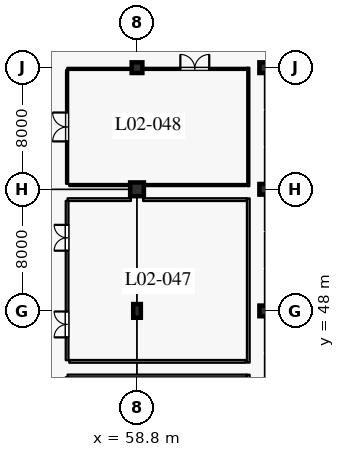
"""IFC4 building model, lengths in metres.
Left out: names, types, materials, properties, quantities, classifications, styles, units other than length and angle.
Written with IfcOpenShell. Run it as: python <this file> out.ifc"""

import sys

from ifc_helpers import new_model, si_unit, direction, frame, frame_2d, origin, origin_2d, place, context, subcontext, project, spatial, rectangle, hollow_rectangle, extrude, element, fill, save


model = new_model("IFC4")
c1 = context("Model", 3, precision=1e-05, world=origin(), true_north=direction((0.0, 1.0)))
c2 = subcontext(c1, "Body", "Model", "MODEL_VIEW")
j1 = project(units=[si_unit("LENGTHUNIT", "METRE"), si_unit("PLANEANGLEUNIT", "RADIAN")], contexts=[c1])
p1 = place(None, origin())
s1 = spatial("IfcSite", under=j1, at=p1, CompositionType="ELEMENT")
p2 = place(p1, origin())
s2 = spatial("IfcBuilding", under=s1, at=p2, CompositionType="ELEMENT")
p3 = place(p2, frame((0.0, 0.0, 11.4)))
s3 = spatial("IfcBuildingStorey", under=s2, at=p3, CompositionType="ELEMENT", Elevation=11.4)
p4 = place(p3, frame((58.8, 48.0, 0.0), z_axis=(0.0, 0.0, 1.0), x_axis=(1.0, 0.0, 0.0)))
e1 = element("IfcColumn", 1, at=p4, inside=s3, PredefinedType="COLUMN", context=c2, shape_type="SweptSolid", body=[
    extrude(hollow_rectangle(XDim=0.5, YDim=0.9, WallThickness=0.024, at=origin_2d()), origin(), (0.0, 0.0, 1.0), 4.8),
])
p5 = place(p3, frame((58.8, 56.0, 0.0), z_axis=(0.0, 0.0, 1.0), x_axis=(1.0, 0.0, 0.0)))
e2 = element("IfcColumn", 2, at=p5, inside=s3, PredefinedType="COLUMN", context=c2, shape_type="SweptSolid", body=[
    extrude(rectangle(XDim=0.9, YDim=0.9, at=origin_2d()), origin(), (0.0, 0.0, 1.0), 4.8),
])
for number, where, z_axis, x_axis in (
    (3, (58.8, 64.0, 0.0), (0.0, 0.0, 1.0), (1.0, 0.0, 0.0)),
    (4, (67.2, 48.0, 0.0), (0.0, 0.0, 1.0), (1.0, 0.0, 0.0)),
    (5, (67.2, 56.0, 0.0), (0.0, 0.0, 1.0), (1.0, 0.0, 0.0)),
    (6, (67.2, 64.0, 0.0), (0.0, 0.0, 1.0), (1.0, 0.0, 0.0)),
):
    element("IfcColumn", number, at=place(p3, frame(where, z_axis=z_axis, x_axis=x_axis)), inside=s3, PredefinedType="COLUMN", context=c2, shape_type="SweptSolid", body=[
        extrude(rectangle(XDim=0.7, YDim=0.7, at=origin_2d()), origin(), (0.0, 0.0, 1.0), 4.8),
    ])
p6 = place(p3, frame((54.2, 32.56, 0.0), z_axis=(0.0, 0.0, 1.0), x_axis=(0.0, 1.0, 0.0)))
e7 = element("IfcWall", 7, at=p6, inside=s3, PredefinedType="PARTITIONING", context=c2, shape_type="SweptSolid", body=[
    extrude(rectangle(XDim=11.08, YDim=0.18, at=frame_2d((5.54, 0.0))), origin(), (0.0, 0.0, 1.0), 4.535),
])
p7 = place(p6, frame((4.69, 0.0, 0.0)))
e8 = element("IfcOpeningElement", 8, at=p7, cuts=e7, PredefinedType="OPENING", context=c2, shape_type="SweptSolid", body=[
    extrude(rectangle(XDim=1.7, YDim=2.3, at=frame_2d((0.85, 1.15))), frame((0.0, 0.1, 0.0), z_axis=(0.0, -1.0, 0.0), x_axis=(1.0, 0.0, 0.0)), (0.0, 0.0, 1.0), 0.2),
])
p8 = place(p3, frame((54.2, 44.76, 0.0), z_axis=(0.0, 0.0, 1.0), x_axis=(0.0, 1.0, 0.0)))
e9 = element("IfcWall", 9, at=p8, inside=s3, PredefinedType="PARTITIONING", context=c2, shape_type="SweptSolid", body=[
    extrude(rectangle(XDim=10.48, YDim=0.18, at=frame_2d((5.24, 0.0))), origin(), (0.0, 0.0, 1.0), 4.535),
])
p9 = place(p8, frame((1.5, 0.0, 0.0)))
e10 = element("IfcOpeningElement", 10, at=p9, cuts=e9, PredefinedType="OPENING", context=c2, shape_type="SweptSolid", body=[
    extrude(rectangle(XDim=1.7, YDim=2.3, at=frame_2d((0.85, 1.15))), frame((0.0, 0.1, 0.0), z_axis=(0.0, -1.0, 0.0), x_axis=(1.0, 0.0, 0.0)), (0.0, 0.0, 1.0), 0.2),
])
p10 = place(p8, frame((7.2, 0.0, 0.0)))
e11 = element("IfcOpeningElement", 11, at=p10, cuts=e9, PredefinedType="OPENING", context=c2, shape_type="SweptSolid", body=[
    extrude(rectangle(XDim=1.7, YDim=2.3, at=frame_2d((0.85, 1.15))), frame((0.0, 0.1, 0.0), z_axis=(0.0, -1.0, 0.0), x_axis=(1.0, 0.0, 0.0)), (0.0, 0.0, 1.0), 0.2),
])
p11 = place(p3, frame((54.34, 44.68, 0.0), z_axis=(0.0, 0.0, 1.0), x_axis=(1.0, 0.0, 0.0)))
e12 = element("IfcWall", 12, at=p11, inside=s3, PredefinedType="PARTITIONING", context=c2, shape_type="SweptSolid", body=[
    extrude(rectangle(XDim=11.61, YDim=0.18, at=frame_2d((5.805, 0.0))), origin(), (0.0, 0.0, 1.0), 4.535),
])
p12 = place(p3, frame((54.2, 56.36, 0.0), z_axis=(0.0, 0.0, 1.0), x_axis=(0.0, 1.0, 0.0)))
e13 = element("IfcWall", 13, at=p12, inside=s3, PredefinedType="PARTITIONING", context=c2, shape_type="SweptSolid", body=[
    extrude(rectangle(XDim=7.48, YDim=0.14, at=frame_2d((3.74, 0.0))), origin(), (0.0, 0.0, 1.0), 4.535),
])
p13 = place(p12, frame((2.79, 0.0, 0.0)))
e14 = element("IfcOpeningElement", 14, at=p13, cuts=e13, PredefinedType="OPENING", context=c2, shape_type="SweptSolid", body=[
    extrude(rectangle(XDim=1.9, YDim=2.4, at=frame_2d((0.95, 1.2))), frame((0.0, 0.08, 0.0), z_axis=(0.0, -1.0, 0.0), x_axis=(1.0, 0.0, 0.0)), (0.0, 0.0, 1.0), 0.16),
])
p14 = place(p3, frame((54.34, 56.28, 0.0), z_axis=(0.0, 0.0, 1.0), x_axis=(1.0, 0.0, 0.0)))
e15 = element("IfcWall", 15, at=p14, inside=s3, PredefinedType="PARTITIONING", context=c2, shape_type="SweptSolid", body=[
    extrude(rectangle(XDim=11.61, YDim=0.14, at=frame_2d((5.805, 0.0))), origin(), (0.0, 0.0, 1.0), 4.535),
])
p15 = place(p3, frame((66.12, 32.4, 0.0), z_axis=(0.0, 0.0, 1.0), x_axis=(0.0, 1.0, 0.0)))
e16 = element("IfcWall", 16, at=p15, inside=s3, PredefinedType="PARTITIONING", context=c2, shape_type="SweptSolid", body=[
    extrude(rectangle(XDim=11.4, YDim=0.18, at=frame_2d((5.7, 0.0))), origin(), (0.0, 0.0, 1.0), 4.535),
])
p16 = place(p3, frame((54.232, 43.72, 0.0), z_axis=(0.0, 0.0, 1.0), x_axis=(1.0, 0.0, 0.0)))
e17 = element("IfcWall", 17, at=p16, inside=s3, PredefinedType="PARTITIONING", context=c2, shape_type="SweptSolid", body=[
    extrude(rectangle(XDim=11.798, YDim=0.18, at=frame_2d((5.899, 0.0))), origin(), (0.0, 0.0, 1.0), 4.535),
])
p17 = place(p3, frame((66.12, 44.6, 0.0), z_axis=(0.0, 0.0, 1.0), x_axis=(0.0, 1.0, 0.0)))
e18 = element("IfcWall", 18, at=p17, inside=s3, PredefinedType="PARTITIONING", context=c2, shape_type="SweptSolid", body=[
    extrude(rectangle(XDim=10.8, YDim=0.18, at=frame_2d((5.4, 0.0))), origin(), (0.0, 0.0, 1.0), 4.535),
])
p18 = place(p3, frame((54.232, 55.32, 0.0), z_axis=(0.0, 0.0, 1.0), x_axis=(1.0, 0.0, 0.0)))
e19 = element("IfcWall", 19, at=p18, inside=s3, PredefinedType="PARTITIONING", context=c2, shape_type="SweptSolid", body=[
    extrude(rectangle(XDim=4.168, YDim=0.18, at=frame_2d((2.084, 0.0))), origin(), (0.0, 0.0, 1.0), 4.535),
])
p19 = place(p3, frame((59.2, 55.32, 0.0), z_axis=(0.0, 0.0, 1.0), x_axis=(1.0, 0.0, 0.0)))
e20 = element("IfcWall", 20, at=p19, inside=s3, PredefinedType="PARTITIONING", context=c2, shape_type="SweptSolid", body=[
    extrude(rectangle(XDim=6.83, YDim=0.18, at=frame_2d((3.415, 0.0))), origin(), (0.0, 0.0, 1.0), 4.535),
])
p20 = place(p3, frame((66.12, 56.2, 0.0), z_axis=(0.0, 0.0, 1.0), x_axis=(0.0, 1.0, 0.0)))
e21 = element("IfcWall", 21, at=p20, inside=s3, PredefinedType="PARTITIONING", context=c2, shape_type="SweptSolid", body=[
    extrude(rectangle(XDim=7.8, YDim=0.14, at=frame_2d((3.9, 0.0))), origin(), (0.0, 0.0, 1.0), 4.535),
])
p21 = place(p3, frame((54.212, 63.92, 0.0), z_axis=(0.0, 0.0, 1.0), x_axis=(1.0, 0.0, 0.0)))
e22 = element("IfcWall", 22, at=p21, inside=s3, PredefinedType="PARTITIONING", context=c2, shape_type="SweptSolid", body=[
    extrude(rectangle(XDim=4.238, YDim=0.14, at=frame_2d((2.119, 0.0))), origin(), (0.0, 0.0, 1.0), 4.535),
])
p22 = place(p3, frame((59.15, 63.92, 0.0), z_axis=(0.0, 0.0, 1.0), x_axis=(1.0, 0.0, 0.0)))
e23 = element("IfcWall", 23, at=p22, inside=s3, PredefinedType="PARTITIONING", context=c2, shape_type="SweptSolid", body=[
    extrude(rectangle(XDim=6.9, YDim=0.14, at=frame_2d((3.45, 0.0))), origin(), (0.0, 0.0, 1.0), 4.535),
])
p23 = place(p22, frame((2.5, 0.0, 0.0)))
e24 = element("IfcOpeningElement", 24, at=p23, cuts=e23, PredefinedType="OPENING", context=c2, shape_type="SweptSolid", body=[
    extrude(rectangle(XDim=1.9, YDim=2.4, at=frame_2d((0.95, 1.2))), frame((0.0, 0.08, 0.0), z_axis=(0.0, -1.0, 0.0), x_axis=(1.0, 0.0, 0.0)), (0.0, 0.0, 1.0), 0.16),
])
p24 = place(p9, origin())
e25 = element("IfcDoor", 25, at=p24, inside=s3, OperationType="DOUBLE_DOOR_SINGLE_SWING", PredefinedType="DOOR", context=c2, shape_type="SweptSolid", body=[
    extrude(rectangle(XDim=1.7, YDim=2.3, at=frame_2d((0.85, 1.15))), frame((0.0, 0.025, 0.0), z_axis=(0.0, -1.0, 0.0), x_axis=(1.0, 0.0, 0.0)), (0.0, 0.0, 1.0), 0.05),
])
fill(e10, e25)
p25 = place(p13, origin())
e26 = element("IfcDoor", 26, at=p25, inside=s3, OperationType="DOUBLE_DOOR_SINGLE_SWING", PredefinedType="DOOR", context=c2, shape_type="SweptSolid", body=[
    extrude(rectangle(XDim=1.9, YDim=2.4, at=frame_2d((0.95, 1.2))), frame((0.0, 0.025, 0.0), z_axis=(0.0, -1.0, 0.0), x_axis=(1.0, 0.0, 0.0)), (0.0, 0.0, 1.0), 0.05),
])
fill(e14, e26)
p26 = place(p10, origin())
e27 = element("IfcDoor", 27, at=p26, inside=s3, OperationType="DOUBLE_DOOR_SINGLE_SWING", PredefinedType="DOOR", context=c2, shape_type="SweptSolid", body=[
    extrude(rectangle(XDim=1.7, YDim=2.3, at=frame_2d((0.85, 1.15))), frame((0.0, 0.025, 0.0), z_axis=(0.0, -1.0, 0.0), x_axis=(1.0, 0.0, 0.0)), (0.0, 0.0, 1.0), 0.05),
])
fill(e11, e27)
p27 = place(p23, origin())
e28 = element("IfcDoor", 28, at=p27, inside=s3, OperationType="DOUBLE_DOOR_SINGLE_SWING", PredefinedType="DOOR", context=c2, shape_type="SweptSolid", body=[
    extrude(rectangle(XDim=1.9, YDim=2.4, at=frame_2d((0.95, 1.2))), frame((0.0, 0.025, 0.0), z_axis=(0.0, -1.0, 0.0), x_axis=(1.0, 0.0, 0.0)), (0.0, 0.0, 1.0), 0.05),
])
fill(e24, e28)
save(model, sys.argv[1])
